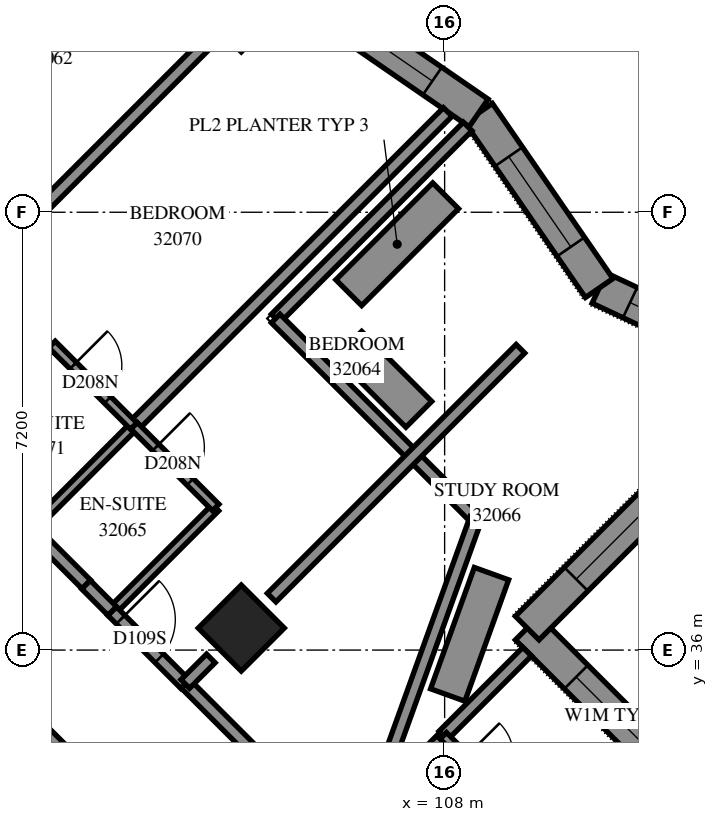
"""IFC4 building model, lengths in metres.
Left out: names, types, materials, properties, quantities, classifications, styles, units other than length and angle.
Written with IfcOpenShell. Run it as: python <this file> out.ifc"""

import sys

from ifc_helpers import new_model, si_unit, direction, frame, frame_2d, origin, origin_2d, place, context, subcontext, project, spatial, polyline, rectangle, outline, extrude, element, fill, save


model = new_model("IFC4")
c1 = context("Model", 3, precision=1e-05, world=origin(), true_north=direction((0.0, 1.0)))
c2 = subcontext(c1, "Body", "Model", "MODEL_VIEW")
j1 = project(units=[si_unit("LENGTHUNIT", "METRE"), si_unit("PLANEANGLEUNIT", "RADIAN")], contexts=[c1])
p1 = place(None, origin())
s1 = spatial("IfcSite", under=j1, at=p1, CompositionType="ELEMENT")
p2 = place(p1, origin())
s2 = spatial("IfcBuilding", under=s1, at=p2, CompositionType="ELEMENT")
p3 = place(p2, frame((0.0, 0.0, 118.6)))
s3 = spatial("IfcBuildingStorey", under=s2, at=p3, CompositionType="ELEMENT", Elevation=118.6)
p4 = place(p3, frame((104.656, 36.362, 0.0), z_axis=(0.0, 0.0, 1.0), x_axis=(0.7071067812, -0.7071067812, 0.0)))
e1 = element("IfcColumn", 1, at=p4, inside=s3, PredefinedType="COLUMN", context=c2, shape_type="SweptSolid", body=[
    extrude(rectangle(XDim=1.0, YDim=1.0, at=origin_2d()), origin(), (0.0, 0.0, 1.0), 3.1),
])
p5 = place(p3, frame((112.823, 32.897, 0.0), z_axis=(0.0, 0.0, 1.0), x_axis=(-0.7071067812, 0.7071067812, 0.0)))
e2 = element("IfcWall", 2, at=p5, inside=s3, PredefinedType="SOLIDWALL", context=c2, shape_type="SweptSolid", body=[
    extrude(outline(polyline([(-0.175, -0.275), (4.625, -0.275), (5.175, 0.275), (0.175, 0.275), (-0.175, -0.275)])), origin(), (0.0, 0.0, 1.0), 3.1),
])
p6 = place(p5, frame((1.963, 0.0, 0.7)))
e3 = element("IfcOpeningElement", 3, at=p6, cuts=e2, PredefinedType="OPENING", context=c2, shape_type="SweptSolid", body=[
    extrude(rectangle(XDim=1.8, YDim=1.8, at=frame_2d((0.9, 0.9))), frame((0.0, 0.285, 0.0), z_axis=(0.0, -1.0, 0.0), x_axis=(1.0, 0.0, 0.0)), (0.0, 0.0, 1.0), 0.57),
])
p7 = place(p3, frame((109.358, 36.362, 0.0), z_axis=(0.0, 0.0, 1.0), x_axis=(0.7071067812, 0.7071067812, 0.0)))
e4 = element("IfcWall", 4, at=p7, inside=s3, PredefinedType="SOLIDWALL", context=c2, shape_type="SweptSolid", body=[
    extrude(outline(polyline([(0.275, -0.275), (6.305, -0.275), (5.522, 0.275), (-0.275, 0.275), (0.275, -0.275)])), origin(), (0.0, 0.0, 1.0), 3.1),
])
p8 = place(p7, frame((1.137, 0.0, 0.7)))
e5 = element("IfcOpeningElement", 5, at=p8, cuts=e4, PredefinedType="OPENING", context=c2, shape_type="SweptSolid", body=[
    extrude(rectangle(XDim=1.8, YDim=1.8, at=frame_2d((0.9, 0.9))), frame((0.0, 0.285, 0.0), z_axis=(0.0, -1.0, 0.0), x_axis=(1.0, 0.0, 0.0)), (0.0, 0.0, 1.0), 0.57),
])
p9 = place(p3, frame((113.54, 40.543, 0.0), z_axis=(0.0, 0.0, 1.0), x_axis=(-0.9048864169, 0.4256531129, 0.0)))
e6 = element("IfcWall", 6, at=p9, inside=s3, PredefinedType="SOLIDWALL", context=c2, shape_type="SweptSolid", body=[
    extrude(outline(polyline([(-0.391, -0.275), (3.239, -0.275), (3.387, 0.275), (0.391, 0.275), (-0.391, -0.275)])), origin(), (0.0, 0.0, 1.0), 3.1),
])
p10 = place(p9, frame((0.952, 0.0, 0.7)))
e7 = element("IfcOpeningElement", 7, at=p10, cuts=e6, PredefinedType="OPENING", context=c2, shape_type="SweptSolid", body=[
    extrude(rectangle(XDim=1.8, YDim=2.0, at=frame_2d((0.9, 1.0))), frame((0.0, 0.285, 0.0), z_axis=(0.0, -1.0, 0.0), x_axis=(1.0, 0.0, 0.0)), (0.0, 0.0, 1.0), 0.57),
])
p11 = place(p3, frame((110.542, 41.953, 0.0), z_axis=(0.0, 0.0, 1.0), x_axis=(-0.5670991884, 0.8236495071, 0.0)))
e8 = element("IfcWall", 8, at=p11, inside=s3, PredefinedType="SOLIDWALL", context=c2, shape_type="SweptSolid", body=[
    extrude(outline(polyline([(0.074, -0.275), (3.547, -0.275), (3.446, 0.275), (-0.074, 0.275), (0.074, -0.275)])), origin(), (0.0, 0.0, 1.0), 3.1),
])
p12 = place(p11, frame((0.823, 0.0, 0.7)))
e9 = element("IfcOpeningElement", 9, at=p12, cuts=e8, PredefinedType="OPENING", context=c2, shape_type="SweptSolid", body=[
    extrude(rectangle(XDim=1.8, YDim=2.0, at=frame_2d((0.9, 1.0))), frame((0.0, 0.285, 0.0), z_axis=(0.0, -1.0, 0.0), x_axis=(1.0, 0.0, 0.0)), (0.0, 0.0, 1.0), 0.57),
])
p13 = place(p3, frame((108.559, 44.833, 0.0), z_axis=(0.0, 0.0, 1.0), x_axis=(-0.8236501806, 0.5670982102, 0.0)))
e10 = element("IfcWall", 10, at=p13, inside=s3, PredefinedType="SOLIDWALL", context=c2, shape_type="SweptSolid", body=[
    extrude(outline(polyline([(-0.051, -0.275), (3.422, -0.275), (3.523, 0.275), (0.051, 0.275), (-0.051, -0.275)])), origin(), (0.0, 0.0, 1.0), 3.1),
])
p14 = place(p13, frame((0.924, 0.0, 0.7)))
e11 = element("IfcOpeningElement", 11, at=p14, cuts=e10, PredefinedType="OPENING", context=c2, shape_type="SweptSolid", body=[
    extrude(rectangle(XDim=1.8, YDim=2.0, at=frame_2d((0.9, 1.0))), frame((0.0, 0.285, 0.0), z_axis=(0.0, -1.0, 0.0), x_axis=(1.0, 0.0, 0.0)), (0.0, 0.0, 1.0), 0.57),
])
p15 = place(p3, frame((108.379, 44.61, 0.0), z_axis=(0.0, 0.0, 1.0), x_axis=(-0.7071179789, -0.7070955833, 0.0)))
e12 = element("IfcWall", 12, at=p15, inside=s3, PredefinedType="PARAPET", context=c2, shape_type="SweptSolid", body=[
    extrude(outline(polyline([(0.0, -0.1), (4.565, -0.1), (4.365, 0.1), (0.0, 0.1), (0.0, -0.1)])), origin(), (0.0, 0.0, 1.0), 0.25),
])
p16 = place(p3, frame((105.222, 41.453, 0.0), z_axis=(0.0, 0.0, 1.0), x_axis=(0.7071067812, -0.7071067812, 0.0)))
e13 = element("IfcWall", 13, at=p16, inside=s3, PredefinedType="PARAPET", context=c2, shape_type="SweptSolid", body=[
    extrude(outline(polyline([(-0.1, -0.1), (4.59, -0.1), (4.718, 0.1), (0.1, 0.1), (-0.1, -0.1)])), origin(), (0.0, 0.0, 1.0), 0.25),
])
p17 = place(p3, frame((108.512, 38.162, 0.0), z_axis=(0.0, 0.0, 1.0), x_axis=(-0.3392396531, -0.9406999829, 0.0)))
e14 = element("IfcWall", 14, at=p17, inside=s3, PredefinedType="PARAPET", context=c2, shape_type="SweptSolid", body=[
    extrude(outline(polyline([(0.064, -0.1), (4.268, -0.1), (4.268, 0.1), (-0.064, 0.1), (0.064, -0.1)])), origin(), (0.0, 0.0, 1.0), 0.25),
])
p18 = place(p3, frame((106.424, 41.029, 0.0), z_axis=(0.0, 0.0, 1.0), x_axis=(0.7071374776, -0.7070760835, 0.0)))
e15 = element("IfcWall", 15, at=p18, inside=s3, PredefinedType="SOLIDWALL", context=c2, shape_type="SweptSolid", body=[
    extrude(rectangle(XDim=1.629, YDim=0.6, at=frame_2d((0.814, 0.0))), origin(), (0.0, 0.0, 1.0), 0.65),
])
p19 = place(p3, frame((96.103, 43.083, 0.0), z_axis=(0.0, 0.0, 1.0), x_axis=(0.7071067812, -0.7071067812, 0.0)))
e16 = element("IfcWall", 16, at=p19, inside=s3, PredefinedType="PARTITIONING", context=c2, shape_type="SweptSolid", body=[
    extrude(rectangle(XDim=8.491, YDim=0.2, at=frame_2d((4.245, 0.0))), origin(), (0.0, 0.0, 1.0), 3.1),
])
p20 = place(p19, frame((1.995, 0.0, 0.0)))
e17 = element("IfcOpeningElement", 17, at=p20, cuts=e16, PredefinedType="OPENING", context=c2, shape_type="SweptSolid", body=[
    extrude(rectangle(XDim=0.9, YDim=2.1, at=frame_2d((0.45, 1.05))), frame((0.0, 0.11, 0.0), z_axis=(0.0, -1.0, 0.0), x_axis=(1.0, 0.0, 0.0)), (0.0, 0.0, 1.0), 0.22),
])
p21 = place(p19, frame((4.27, 0.0, 0.0)))
e18 = element("IfcOpeningElement", 18, at=p21, cuts=e16, PredefinedType="OPENING", context=c2, shape_type="SweptSolid", body=[
    extrude(rectangle(XDim=0.9, YDim=2.1, at=frame_2d((0.45, 1.05))), frame((0.0, 0.11, 0.0), z_axis=(0.0, -1.0, 0.0), x_axis=(1.0, 0.0, 0.0)), (0.0, 0.0, 1.0), 0.22),
])
p22 = place(p3, frame((102.887, 39.687, 0.0), z_axis=(0.0, 0.0, 1.0), x_axis=(0.707250564, 0.7069629691, 0.0)))
e19 = element("IfcWall", 19, at=p22, inside=s3, PredefinedType="PARTITIONING", context=c2, shape_type="SweptSolid", body=[
    extrude(rectangle(XDim=7.302, YDim=0.2, at=frame_2d((3.651, 0.0))), origin(), (0.0, 0.0, 1.0), 3.1),
])
p23 = place(p3, frame((108.831, 30.355, 0.0), z_axis=(0.0, 0.0, 1.0), x_axis=(-0.7073012053, 0.7069123036, 0.0)))
e20 = element("IfcWall", 20, at=p23, inside=s3, PredefinedType="PARTITIONING", context=c2, shape_type="SweptSolid", body=[
    extrude(rectangle(XDim=7.2, YDim=0.2, at=frame_2d((3.6, 0.0))), origin(), (0.0, 0.0, 1.0), 3.1),
])
p24 = place(p23, frame((4.125, 0.0, 0.0)))
e21 = element("IfcOpeningElement", 21, at=p24, cuts=e20, PredefinedType="OPENING", context=c2, shape_type="SweptSolid", body=[
    extrude(rectangle(XDim=1.0, YDim=2.1, at=frame_2d((0.5, 1.05))), frame((0.0, 0.11, 0.0), z_axis=(0.0, -1.0, 0.0), x_axis=(1.0, 0.0, 0.0)), (0.0, 0.0, 1.0), 0.22),
])
p25 = place(p23, frame((0.705, 0.0, 0.0)))
e22 = element("IfcOpeningElement", 22, at=p25, cuts=e20, PredefinedType="OPENING", context=c2, shape_type="SweptSolid", body=[
    extrude(rectangle(XDim=0.9, YDim=2.1, at=frame_2d((0.45, 1.05))), frame((0.0, 0.11, 0.0), z_axis=(0.0, -1.0, 0.0), x_axis=(1.0, 0.0, 0.0)), (0.0, 0.0, 1.0), 0.22),
])
p26 = place(p3, frame((97.795, 44.777, 0.0), z_axis=(0.0, 0.0, 1.0), x_axis=(0.7071136921, 0.7070998702, 0.0)))
e23 = element("IfcWall", 23, at=p26, inside=s3, PredefinedType="PARTITIONING", context=c2, shape_type="SweptSolid", body=[
    extrude(rectangle(XDim=7.235, YDim=0.2, at=frame_2d((3.617, 0.0))), origin(), (0.0, 0.0, 1.0), 3.1),
])
for number, where, z_axis, x_axis in (
    (24, (105.155, 36.863, 0.0), (0.0, 0.0, 1.0), (0.707, 0.707, 0.0)),
    (25, (100.063, 41.953, 0.0), (0.0, 0.0, 1.0), (0.707, 0.707, 0.0)),
):
    element("IfcWall", number, at=place(p3, frame(where, z_axis=z_axis, x_axis=x_axis)), inside=s3, PredefinedType="PARTITIONING", context=c2, shape_type="SweptSolid", body=[
        extrude(rectangle(XDim=5.787, YDim=0.2, at=frame_2d((2.893, 0.0))), origin(), (0.0, 0.0, 1.0), 3.1),
    ])
p27 = place(p3, frame((102.533, 36.645, 0.0), z_axis=(0.0, 0.0, 1.0), x_axis=(0.7071067812, 0.7071067812, 0.0)))
e26 = element("IfcWall", 26, at=p27, inside=s3, PredefinedType="PARTITIONING", context=c2, shape_type="SweptSolid", body=[
    extrude(rectangle(XDim=2.401, YDim=0.15, at=frame_2d((1.201, 0.0))), origin(), (0.0, 0.0, 1.0), 3.1),
])
p28 = place(p3, frame((101.192, 37.988, 0.0), z_axis=(0.0, 0.0, 1.0), x_axis=(0.706689978, 0.7075233388, 0.0)))
e27 = element("IfcWall", 27, at=p28, inside=s3, PredefinedType="PARTITIONING", context=c2, shape_type="SweptSolid", body=[
    extrude(rectangle(XDim=2.4, YDim=0.15, at=frame_2d((1.2, 0.0))), origin(), (0.0, 0.0, 1.0), 3.1),
])
for number, where, z_axis, x_axis in (
    (28, (106.283, 32.899, 0.0), (0.0, 0.0, 1.0), (0.707, 0.707, 0.0)),
    (29, (99.847, 39.333, 0.0), (0.0, 0.0, 1.0), (0.707, 0.707, 0.0)),
):
    element("IfcWall", number, at=place(p3, frame(where, z_axis=z_axis, x_axis=x_axis)), inside=s3, PredefinedType="PARTITIONING", context=c2, shape_type="SweptSolid", body=[
        extrude(rectangle(XDim=2.398, YDim=0.15, at=frame_2d((1.199, 0.0))), origin(), (0.0, 0.0, 1.0), 3.1),
    ])
p29 = place(p3, frame((102.891, 39.69, 0.0), z_axis=(0.0, 0.0, 1.0), x_axis=(0.7071067812, -0.7071067812, 0.0)))
e30 = element("IfcWall", 30, at=p29, inside=s3, PredefinedType="PARTITIONING", context=c2, shape_type="SweptSolid", body=[
    extrude(rectangle(XDim=1.901, YDim=0.15, at=frame_2d((0.95, 0.0))), origin(), (0.0, 0.0, 1.0), 3.1),
])
p30 = place(p29, frame((0.505, 0.0, 0.0)))
e31 = element("IfcOpeningElement", 31, at=p30, cuts=e30, PredefinedType="OPENING", context=c2, shape_type="SweptSolid", body=[
    extrude(rectangle(XDim=0.8, YDim=2.1, at=frame_2d((0.4, 1.05))), frame((0.0, 0.085, 0.0), z_axis=(0.0, -1.0, 0.0), x_axis=(1.0, 0.0, 0.0)), (0.0, 0.0, 1.0), 0.17),
])
p31 = place(p3, frame((107.979, 34.595, 0.0), z_axis=(0.0, 0.0, 1.0), x_axis=(0.7071067812, 0.7071067812, 0.0)))
e32 = element("IfcWall", 32, at=p31, inside=s3, PredefinedType="PARTITIONING", context=c2, shape_type="SweptSolid", body=[
    extrude(rectangle(XDim=1.95, YDim=0.2, at=frame_2d((0.975, 0.0))), origin(), (0.0, 0.0, 1.0), 3.1),
])
p32 = place(p3, frame((100.839, 35.231, 0.0), z_axis=(0.0, 0.0, 1.0), x_axis=(0.7065800724, -0.7076330979, 0.0)))
e33 = element("IfcWall", 33, at=p32, inside=s3, PredefinedType="PARTITIONING", context=c2, shape_type="SweptSolid", body=[
    extrude(rectangle(XDim=1.899, YDim=0.2, at=frame_2d((0.95, 0.0))), origin(), (0.0, 0.0, 1.0), 3.1),
])
p33 = place(p3, frame((107.977, 34.591, 0.0), z_axis=(0.0, 0.0, 1.0), x_axis=(0.7065800724, -0.7076330979, 0.0)))
e34 = element("IfcWall", 34, at=p33, inside=s3, PredefinedType="PARTITIONING", context=c2, shape_type="SweptSolid", body=[
    extrude(rectangle(XDim=1.899, YDim=0.15, at=frame_2d((0.95, 0.0))), origin(), (0.0, 0.0, 1.0), 3.1),
])
p34 = place(p33, frame((0.508, 0.0, 0.0)))
e35 = element("IfcOpeningElement", 35, at=p34, cuts=e34, PredefinedType="OPENING", context=c2, shape_type="SweptSolid", body=[
    extrude(rectangle(XDim=0.8, YDim=2.1, at=frame_2d((0.4, 1.05))), frame((0.0, 0.085, 0.0), z_axis=(0.0, -1.0, 0.0), x_axis=(1.0, 0.0, 0.0)), (0.0, 0.0, 1.0), 0.17),
])
p35 = place(p3, frame((101.543, 41.027, 0.0), z_axis=(0.0, 0.0, 1.0), x_axis=(0.7076330979, -0.7065800724, 0.0)))
e36 = element("IfcWall", 36, at=p35, inside=s3, PredefinedType="PARTITIONING", context=c2, shape_type="SweptSolid", body=[
    extrude(rectangle(XDim=1.899, YDim=0.15, at=frame_2d((0.95, 0.0))), origin(), (0.0, 0.0, 1.0), 3.1),
])
p36 = place(p35, frame((0.493, 0.0, 0.0)))
e37 = element("IfcOpeningElement", 37, at=p36, cuts=e36, PredefinedType="OPENING", context=c2, shape_type="SweptSolid", body=[
    extrude(rectangle(XDim=0.8, YDim=2.1, at=frame_2d((0.4, 1.05))), frame((0.0, 0.085, 0.0), z_axis=(0.0, -1.0, 0.0), x_axis=(1.0, 0.0, 0.0)), (0.0, 0.0, 1.0), 0.17),
])
p37 = place(p3, frame((102.531, 36.641, 0.0), z_axis=(0.0, 0.0, 1.0), x_axis=(0.7071067812, -0.7071067812, 0.0)))
e38 = element("IfcWall", 38, at=p37, inside=s3, PredefinedType="PARTITIONING", context=c2, shape_type="SweptSolid", body=[
    extrude(rectangle(XDim=1.7, YDim=0.2, at=frame_2d((0.85, 0.0))), origin(), (0.0, 0.0, 1.0), 3.1),
])
p38 = place(p37, frame((0.198, 0.0, 0.0)))
e39 = element("IfcOpeningElement", 39, at=p38, cuts=e38, PredefinedType="OPENING", context=c2, shape_type="SweptSolid", body=[
    extrude(rectangle(XDim=0.9, YDim=2.1, at=frame_2d((0.45, 1.05))), frame((0.0, 0.11, 0.0), z_axis=(0.0, -1.0, 0.0), x_axis=(1.0, 0.0, 0.0)), (0.0, 0.0, 1.0), 0.22),
])
p39 = place(p3, frame((102.103, 37.075, 0.0), z_axis=(0.0, 0.0, 1.0), x_axis=(0.7054642634, -0.7087454925, 0.0)))
e40 = element("IfcWall", 40, at=p39, inside=s3, PredefinedType="PARTITIONING", context=c2, shape_type="SweptSolid", body=[
    extrude(rectangle(XDim=0.61, YDim=0.2, at=frame_2d((0.305, 0.0))), origin(), (0.0, 0.0, 1.0), 3.1),
])
p40 = place(p3, frame((103.735, 35.443, 0.0), z_axis=(0.0, 0.0, 1.0), x_axis=(0.7071067812, 0.7071067812, 0.0)))
e41 = element("IfcWall", 41, at=p40, inside=s3, PredefinedType="PARTITIONING", context=c2, shape_type="SweptSolid", body=[
    extrude(rectangle(XDim=0.594, YDim=0.2, at=frame_2d((0.297, 0.0))), origin(), (0.0, 0.0, 1.0), 2.6),
])
p41 = place(p3, frame((108.017, 43.47, 0.0), z_axis=(0.0, 0.0, 1.0), x_axis=(-0.7071289757, -0.707084586, 0.0)))
e42 = element("IfcWall", 42, at=p41, inside=s3, PredefinedType="SOLIDWALL", context=c2, shape_type="SweptSolid", body=[
    extrude(outline(polyline([(0.0, -0.3), (2.253, -0.3), (2.253, 0.3), (0.0, 0.3), (0.0, -0.3)])), origin(), (0.0, 0.0, 1.0), 0.65),
])
p42 = place(p3, frame((108.771, 37.257, 0.0), z_axis=(0.0, 0.0, 1.0), x_axis=(-0.3392436018, -0.9406985589, 0.0)))
e43 = element("IfcWall", 43, at=p42, inside=s3, PredefinedType="SOLIDWALL", context=c2, shape_type="SweptSolid", body=[
    extrude(outline(polyline([(0.0, -0.3), (2.121, -0.3), (2.121, 0.3), (0.0, 0.3), (0.0, -0.3)])), origin(), (0.0, 0.0, 1.0), 0.65),
])
p43 = place(p6, origin())
e44 = element("IfcWindow", 44, at=p43, inside=s3, PartitioningType="SINGLE_PANEL", PredefinedType="WINDOW", context=c2, shape_type="SweptSolid", body=[
    extrude(rectangle(XDim=1.8, YDim=1.8, at=frame_2d((0.9, 0.9))), frame((0.0, 0.155, 0.0), z_axis=(0.0, -1.0, 0.0), x_axis=(1.0, 0.0, 0.0)), (0.0, 0.0, 1.0), 0.06),
])
fill(e3, e44)
p44 = place(p8, origin())
e45 = element("IfcWindow", 45, at=p44, inside=s3, PartitioningType="SINGLE_PANEL", PredefinedType="WINDOW", context=c2, shape_type="SweptSolid", body=[
    extrude(rectangle(XDim=1.8, YDim=1.8, at=frame_2d((0.9, 0.9))), frame((0.0, 0.155, 0.0), z_axis=(0.0, -1.0, 0.0), x_axis=(1.0, 0.0, 0.0)), (0.0, 0.0, 1.0), 0.06),
])
fill(e5, e45)
p45 = place(p10, origin())
e46 = element("IfcWindow", 46, at=p45, inside=s3, PartitioningType="SINGLE_PANEL", PredefinedType="WINDOW", context=c2, shape_type="SweptSolid", body=[
    extrude(rectangle(XDim=1.8, YDim=2.0, at=frame_2d((0.9, 1.0))), frame((0.0, 0.155, 0.0), z_axis=(0.0, -1.0, 0.0), x_axis=(1.0, 0.0, 0.0)), (0.0, 0.0, 1.0), 0.06),
])
fill(e7, e46)
p46 = place(p12, origin())
e47 = element("IfcWindow", 47, at=p46, inside=s3, PartitioningType="SINGLE_PANEL", PredefinedType="WINDOW", context=c2, shape_type="SweptSolid", body=[
    extrude(rectangle(XDim=1.8, YDim=2.0, at=frame_2d((0.9, 1.0))), frame((0.0, 0.155, 0.0), z_axis=(0.0, -1.0, 0.0), x_axis=(1.0, 0.0, 0.0)), (0.0, 0.0, 1.0), 0.06),
])
fill(e9, e47)
p47 = place(p14, origin())
e48 = element("IfcWindow", 48, at=p47, inside=s3, PartitioningType="SINGLE_PANEL", PredefinedType="WINDOW", context=c2, shape_type="SweptSolid", body=[
    extrude(rectangle(XDim=1.8, YDim=2.0, at=frame_2d((0.9, 1.0))), frame((0.0, 0.155, 0.0), z_axis=(0.0, -1.0, 0.0), x_axis=(1.0, 0.0, 0.0)), (0.0, 0.0, 1.0), 0.06),
])
fill(e11, e48)
p48 = place(p38, origin())
e49 = element("IfcDoor", 49, at=p48, inside=s3, OperationType="SINGLE_SWING_RIGHT", PredefinedType="DOOR", context=c2, shape_type="SweptSolid", body=[
    extrude(rectangle(XDim=0.9, YDim=2.1, at=frame_2d((0.45, 1.05))), frame((0.0, 0.025, 0.0), z_axis=(0.0, -1.0, 0.0), x_axis=(1.0, 0.0, 0.0)), (0.0, 0.0, 1.0), 0.05),
])
fill(e39, e49)
p49 = place(p30, origin())
e50 = element("IfcDoor", 50, at=p49, inside=s3, OperationType="SINGLE_SWING_RIGHT", PredefinedType="DOOR", context=c2, shape_type="SweptSolid", body=[
    extrude(rectangle(XDim=0.8, YDim=2.1, at=frame_2d((0.4, 1.05))), frame((0.0, 0.025, 0.0), z_axis=(0.0, -1.0, 0.0), x_axis=(1.0, 0.0, 0.0)), (0.0, 0.0, 1.0), 0.05),
])
fill(e31, e50)
p50 = place(p36, origin())
e51 = element("IfcDoor", 51, at=p50, inside=s3, OperationType="SINGLE_SWING_RIGHT", PredefinedType="DOOR", context=c2, shape_type="SweptSolid", body=[
    extrude(rectangle(XDim=0.8, YDim=2.1, at=frame_2d((0.4, 1.05))), frame((0.0, 0.025, 0.0), z_axis=(0.0, -1.0, 0.0), x_axis=(1.0, 0.0, 0.0)), (0.0, 0.0, 1.0), 0.05),
])
fill(e37, e51)
save(model, sys.argv[1])
